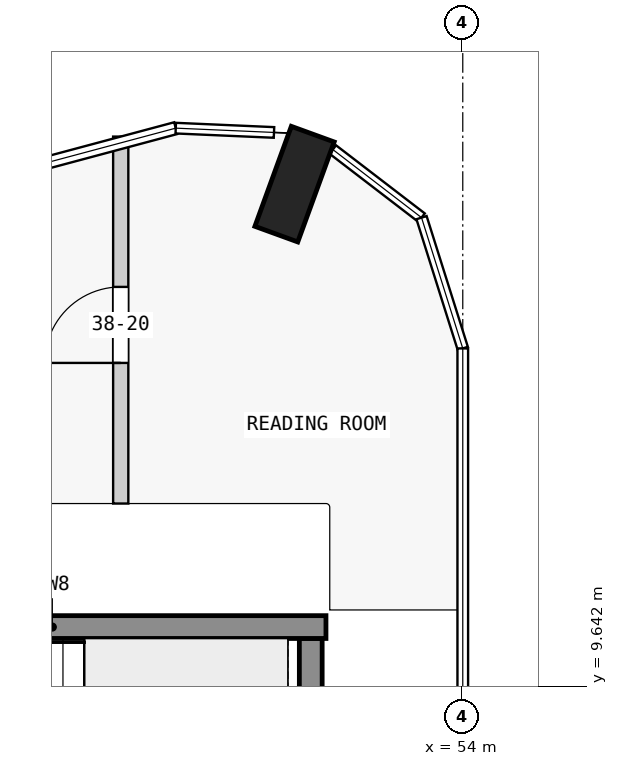
"""IFC4 building model, lengths in metres.
Left out: names, types, materials, properties, quantities, classifications, styles, units other than length and angle.
Written with IfcOpenShell. Run it as: python <this file> out.ifc"""

import sys

from ifc_helpers import new_model, si_unit, direction, frame, frame_2d, origin, origin_2d, place, context, subcontext, project, spatial, rectangle, extrude, element, fill, save


model = new_model("IFC4")
c1 = context("Model", 3, precision=1e-05, world=origin(), true_north=direction((0.0, 1.0)))
c2 = subcontext(c1, "Body", "Model", "MODEL_VIEW")
j1 = project(units=[si_unit("LENGTHUNIT", "METRE"), si_unit("PLANEANGLEUNIT", "RADIAN")], contexts=[c1])
p1 = place(None, origin())
s1 = spatial("IfcSite", under=j1, at=p1, CompositionType="ELEMENT")
p2 = place(p1, origin())
s2 = spatial("IfcBuilding", under=s1, at=p2, CompositionType="ELEMENT")
p3 = place(p2, frame((0.0, 0.0, 149.9)))
s3 = spatial("IfcBuildingStorey", under=s2, at=p3, CompositionType="ELEMENT", Elevation=149.9)
p4 = place(p3, frame((51.787, 16.252, 0.0), z_axis=(0.0, 0.0, 1.0), x_axis=(-0.939664280925, 0.342097996418, 0.0)))
e1 = element("IfcColumn", 1, at=p4, inside=s3, PredefinedType="COLUMN", context=c2, shape_type="SweptSolid", body=[
    extrude(rectangle(XDim=0.6, YDim=1.4, at=origin_2d()), origin(), (0.0, 0.0, 1.0), 3.5),
])
p5 = place(p3, frame((52.0, 7.725, 0.0), z_axis=(0.0, 0.0, 1.0), x_axis=(0.0, 1.0, 0.0)))
e2 = element("IfcWall", 2, at=p5, inside=s3, PredefinedType="SHEAR", context=c2, shape_type="SweptSolid", body=[
    extrude(rectangle(XDim=2.55, YDim=0.3, at=frame_2d((1.275, 0.0))), origin(), (0.0, 0.0, 1.0), 3.5),
])
p6 = place(p3, frame((45.0, 10.425, 0.0), z_axis=(0.0, 0.0, 1.0), x_axis=(1.0, 0.0, 0.0)))
e3 = element("IfcWall", 3, at=p6, inside=s3, PredefinedType="SHEAR", context=c2, shape_type="SweptSolid", body=[
    extrude(rectangle(XDim=7.2, YDim=0.3, at=frame_2d((3.6, 0.0))), origin(), (0.0, 0.0, 1.0), 3.5),
])
p7 = place(p3, frame((49.5, 12.05, 0.0), z_axis=(0.0, 0.0, 1.0), x_axis=(0.0, 1.0, 0.0)))
e4 = element("IfcWall", 4, at=p7, inside=s3, PredefinedType="PARTITIONING", context=c2, shape_type="SweptSolid", body=[
    extrude(rectangle(XDim=4.828, YDim=0.2, at=frame_2d((2.414, 0.0))), origin(), (0.0, 0.0, 1.0), 3.25),
])
p8 = place(p7, frame((1.85, 0.0, 0.0)))
e5 = element("IfcOpeningElement", 5, at=p8, cuts=e4, PredefinedType="OPENING", context=c2, shape_type="SweptSolid", body=[
    extrude(rectangle(XDim=1.0, YDim=2.1, at=frame_2d((0.5, 1.05))), frame((0.0, 0.11, 0.0), z_axis=(0.0, -1.0, 0.0), x_axis=(1.0, 0.0, 0.0)), (0.0, 0.0, 1.0), 0.22),
])
p9 = place(p8, origin())
e6 = element("IfcDoor", 6, at=p9, inside=s3, OperationType="SINGLE_SWING_LEFT", PredefinedType="DOOR", context=c2, shape_type="SweptSolid", body=[
    extrude(rectangle(XDim=1.0, YDim=2.1, at=frame_2d((0.5, 1.05))), frame((0.0, 0.025, 0.0), z_axis=(0.0, -1.0, 0.0), x_axis=(1.0, 0.0, 0.0)), (0.0, 0.0, 1.0), 0.05),
])
fill(e5, e6)
save(model, sys.argv[1])
